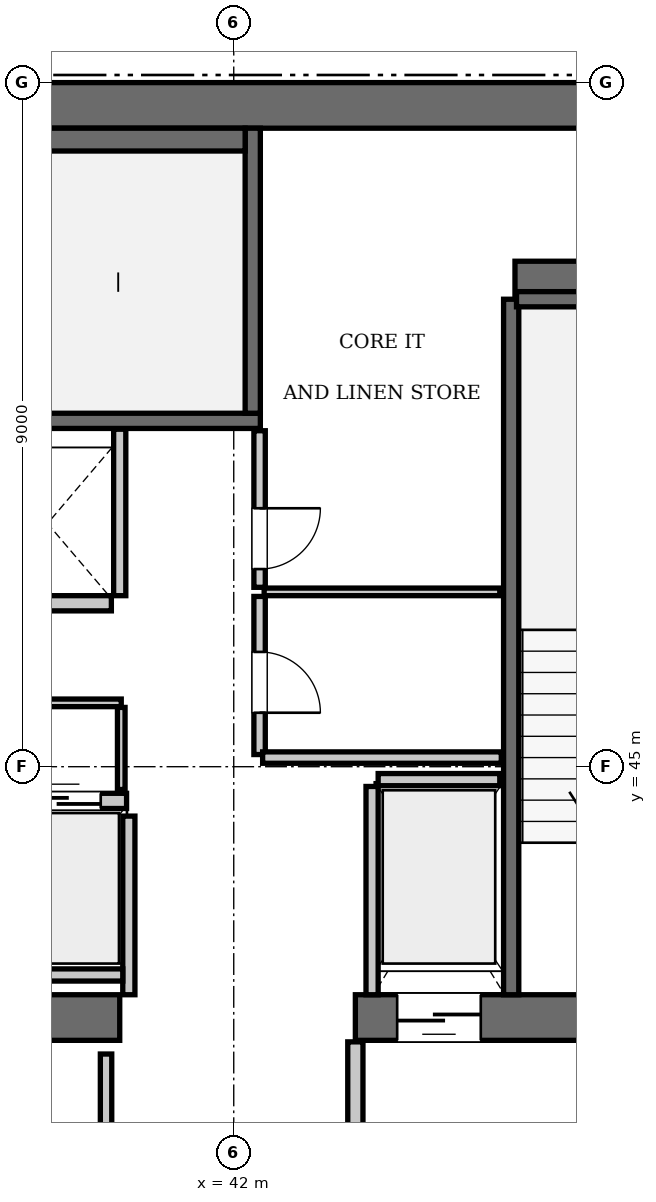
"""IFC4 building model, lengths in metres.
Left out: names, types, materials, properties, quantities, classifications, styles, units other than length and angle.
Written with IfcOpenShell. Run it as: python <this file> out.ifc"""

import sys

from ifc_helpers import new_model, si_unit, direction, frame, frame_2d, origin, place, context, subcontext, project, spatial, rectangle, extrude, element, fill, save


model = new_model("IFC4")
c1 = context("Model", 3, precision=1e-05, world=origin(), true_north=direction((0.0, 1.0)))
c2 = subcontext(c1, "Body", "Model", "MODEL_VIEW")
j1 = project(units=[si_unit("LENGTHUNIT", "METRE"), si_unit("PLANEANGLEUNIT", "RADIAN")], contexts=[c1])
p1 = place(None, origin())
s1 = spatial("IfcSite", under=j1, at=p1, CompositionType="ELEMENT")
p2 = place(p1, origin())
s2 = spatial("IfcBuilding", under=s1, at=p2, CompositionType="ELEMENT")
p3 = place(p2, frame((0.0, 0.0, 293.3)))
s3 = spatial("IfcBuildingStorey", under=s2, at=p3, CompositionType="ELEMENT", Elevation=293.3)
p4 = place(p3, frame((25.2, 53.7, 0.0), z_axis=(0.0, 0.0, 1.0), x_axis=(1.0, 0.0, 0.0)))
e1 = element("IfcWall", 1, at=p4, inside=s3, PredefinedType="SHEAR", context=c2, shape_type="SweptSolid", body=[
    extrude(rectangle(XDim=25.2, YDim=0.6, at=frame_2d((12.6, 0.0))), origin(), (0.0, 0.0, 1.0), 3.85),
])
p5 = place(p3, frame((35.1, 41.7, 0.0), z_axis=(0.0, 0.0, 1.0), x_axis=(1.0, 0.0, 0.0)))
e2 = element("IfcWall", 2, at=p5, inside=s3, PredefinedType="SHEAR", context=c2, shape_type="SweptSolid", body=[
    extrude(rectangle(XDim=5.4, YDim=0.6, at=frame_2d((2.7, 0.0))), origin(), (0.0, 0.0, 1.0), 3.85),
])
p6 = place(p3, frame((43.6, 41.7, 0.0), z_axis=(0.0, 0.0, 1.0), x_axis=(1.0, 0.0, 0.0)))
e3 = element("IfcWall", 3, at=p6, inside=s3, PredefinedType="SHEAR", context=c2, shape_type="SweptSolid", body=[
    extrude(rectangle(XDim=6.8, YDim=0.6, at=frame_2d((3.4, 0.0))), origin(), (0.0, 0.0, 1.0), 3.85),
])
p7 = place(p6, frame((3.9, 0.0, 0.0)))
e4 = element("IfcOpeningElement", 4, at=p7, cuts=e3, PredefinedType="OPENING", context=c2, shape_type="SweptSolid", body=[
    extrude(rectangle(XDim=1.15, YDim=2.15, at=frame_2d((0.575, 1.075))), frame((0.0, 0.31, 0.0), z_axis=(0.0, -1.0, 0.0), x_axis=(1.0, 0.0, 0.0)), (0.0, 0.0, 1.0), 0.62),
])
p8 = place(p6, frame((0.55, 0.0, 0.0)))
e5 = element("IfcOpeningElement", 5, at=p8, cuts=e3, PredefinedType="OPENING", context=c2, shape_type="SweptSolid", body=[
    extrude(rectangle(XDim=1.1, YDim=2.2, at=frame_2d((0.55, 1.1))), frame((0.0, 0.31, 0.0), z_axis=(0.0, -1.0, 0.0), x_axis=(1.0, 0.0, 0.0)), (0.0, 0.0, 1.0), 0.62),
])
p9 = place(p3, frame((45.7, 51.4, 0.0), z_axis=(0.0, 0.0, 1.0), x_axis=(1.0, 0.0, 0.0)))
e6 = element("IfcWall", 6, at=p9, inside=s3, PredefinedType="SHEAR", context=c2, shape_type="SweptSolid", body=[
    extrude(rectangle(XDim=4.1, YDim=0.5, at=frame_2d((2.05, 0.0))), origin(), (0.0, 0.0, 1.0), 3.85),
])
p10 = place(p3, frame((33.25, 49.55, 0.0), z_axis=(0.0, 0.0, 1.0), x_axis=(1.0, 0.0, 0.0)))
e7 = element("IfcWall", 7, at=p10, inside=s3, PredefinedType="SOLIDWALL", context=c2, shape_type="SweptSolid", body=[
    extrude(rectangle(XDim=9.1, YDim=0.2, at=frame_2d((4.55, 0.0))), origin(), (0.0, 0.0, 1.0), 3.61),
])
p11 = place(p3, frame((42.25, 49.65, 0.0), z_axis=(0.0, 0.0, 1.0), x_axis=(0.0, 1.0, 0.0)))
e8 = element("IfcWall", 8, at=p11, inside=s3, PredefinedType="SOLIDWALL", context=c2, shape_type="SweptSolid", body=[
    extrude(rectangle(XDim=3.75, YDim=0.2, at=frame_2d((1.875, 0.0))), origin(), (0.0, 0.0, 1.0), 3.61),
])
p12 = place(p3, frame((33.45, 53.25, 0.0), z_axis=(0.0, 0.0, 1.0), x_axis=(1.0, 0.0, 0.0)))
e9 = element("IfcWall", 9, at=p12, inside=s3, PredefinedType="SOLIDWALL", context=c2, shape_type="SweptSolid", body=[
    extrude(rectangle(XDim=8.7, YDim=0.3, at=frame_2d((4.35, 0.0))), origin(), (0.0, 0.0, 1.0), 3.61),
])
p13 = place(p3, frame((45.65, 42.0, 0.0), z_axis=(0.0, 0.0, 1.0), x_axis=(0.0, 1.0, 0.0)))
e10 = element("IfcWall", 10, at=p13, inside=s3, PredefinedType="SOLIDWALL", context=c2, shape_type="SweptSolid", body=[
    extrude(rectangle(XDim=9.15, YDim=0.2, at=frame_2d((4.575, 0.0))), origin(), (0.0, 0.0, 1.0), 3.61),
])
p14 = place(p3, frame((45.72, 51.15, 0.0), z_axis=(0.0, 0.0, 1.0), x_axis=(1.0, 0.0, 0.0)))
e11 = element("IfcWall", 11, at=p14, inside=s3, PredefinedType="SOLIDWALL", context=c2, shape_type="SweptSolid", body=[
    extrude(rectangle(XDim=3.5, YDim=0.2, at=frame_2d((1.75, 0.0))), origin(), (0.0, 0.0, 1.0), 3.61),
])
p15 = place(p3, frame((38.91, 44.55, 0.0), z_axis=(0.0, 0.0, 1.0), x_axis=(1.0, 0.0, 0.0)))
e12 = element("IfcWall", 12, at=p15, inside=s3, PredefinedType="SOLIDWALL", context=c2, shape_type="SweptSolid", body=[
    extrude(rectangle(XDim=1.68, YDim=0.2, at=frame_2d((0.84, 0.0))), origin(), (0.0, 0.0, 1.0), 3.61),
])
p16 = place(p15, frame((0.34, 0.0, 0.0)))
e13 = element("IfcOpeningElement", 13, at=p16, cuts=e12, PredefinedType="OPENING", context=c2, shape_type="SweptSolid", body=[
    extrude(rectangle(XDim=1.0, YDim=2.15, at=frame_2d((0.5, 1.075))), frame((0.0, 0.11, 0.0), z_axis=(0.0, -1.0, 0.0), x_axis=(1.0, 0.0, 0.0)), (0.0, 0.0, 1.0), 0.22),
])
p17 = place(p3, frame((38.71, 47.15, 0.0), z_axis=(0.0, 0.0, 1.0), x_axis=(1.0, 0.0, 0.0)))
e14 = element("IfcWall", 14, at=p17, inside=s3, PredefinedType="SOLIDWALL", context=c2, shape_type="SweptSolid", body=[
    extrude(rectangle(XDim=1.68, YDim=0.2, at=frame_2d((0.84, 0.0))), origin(), (0.0, 0.0, 1.0), 3.61),
])
p18 = place(p3, frame((43.9, 44.83, 0.0), z_axis=(0.0, 0.0, 1.0), x_axis=(1.0, 0.0, 0.0)))
e15 = element("IfcWall", 15, at=p18, inside=s3, PredefinedType="SOLIDWALL", context=c2, shape_type="SweptSolid", body=[
    extrude(rectangle(XDim=1.6, YDim=0.16, at=frame_2d((0.8, 0.0))), origin(), (0.0, 0.0, 1.0), 3.61),
])
p19 = place(p3, frame((43.82, 42.0, 0.0), z_axis=(0.0, 0.0, 1.0), x_axis=(0.0, 1.0, 0.0)))
e16 = element("IfcWall", 16, at=p19, inside=s3, PredefinedType="SOLIDWALL", context=c2, shape_type="SweptSolid", body=[
    extrude(rectangle(XDim=2.74, YDim=0.16, at=frame_2d((1.37, 0.0))), origin(), (0.0, 0.0, 1.0), 3.61),
])
p20 = place(p3, frame((40.62, 42.0, 0.0), z_axis=(0.0, 0.0, 1.0), x_axis=(0.0, 1.0, 0.0)))
e17 = element("IfcWall", 17, at=p20, inside=s3, PredefinedType="SOLIDWALL", context=c2, shape_type="SweptSolid", body=[
    extrude(rectangle(XDim=2.35, YDim=0.16, at=frame_2d((1.175, 0.0))), origin(), (0.0, 0.0, 1.0), 3.61),
])
p21 = place(p3, frame((35.52, 42.26, 0.0), z_axis=(0.0, 0.0, 1.0), x_axis=(1.0, 0.0, 0.0)))
e18 = element("IfcWall", 18, at=p21, inside=s3, PredefinedType="SOLIDWALL", context=c2, shape_type="SweptSolid", body=[
    extrude(rectangle(XDim=5.02, YDim=0.16, at=frame_2d((2.51, 0.0))), origin(), (0.0, 0.0, 1.0), 3.61),
])
p22 = place(p3, frame((40.5, 47.25, 0.0), z_axis=(0.0, 0.0, 1.0), x_axis=(0.0, 1.0, 0.0)))
e19 = element("IfcWall", 19, at=p22, inside=s3, PredefinedType="SOLIDWALL", context=c2, shape_type="SweptSolid", body=[
    extrude(rectangle(XDim=2.19, YDim=0.16, at=frame_2d((1.095, 0.0))), origin(), (0.0, 0.0, 1.0), 3.61),
])
p23 = place(p3, frame((43.6, 38.31, 0.0), z_axis=(0.0, 0.0, 1.0), x_axis=(0.0, 1.0, 0.0)))
e20 = element("IfcWall", 20, at=p23, inside=s3, PredefinedType="PARTITIONING", context=c2, shape_type="SweptSolid", body=[
    extrude(rectangle(XDim=3.07, YDim=0.2, at=frame_2d((1.535, 0.0))), origin(), (0.0, 0.0, 1.0), 3.61),
])
p24 = place(p3, frame((35.58, 45.84, 0.0), z_axis=(0.0, 0.0, 1.0), x_axis=(1.0, 0.0, 0.0)))
e21 = element("IfcWall", 21, at=p24, inside=s3, PredefinedType="PARTITIONING", context=c2, shape_type="SweptSolid", body=[
    extrude(rectangle(XDim=4.94, YDim=0.1, at=frame_2d((2.47, 0.0))), origin(), (0.0, 0.0, 1.0), 3.61),
])
p25 = place(p24, frame((1.8, 0.0, 0.0)))
e22 = element("IfcOpeningElement", 22, at=p25, cuts=e21, PredefinedType="OPENING", context=c2, shape_type="SweptSolid", body=[
    extrude(rectangle(XDim=0.8, YDim=2.05, at=frame_2d((0.4, 1.025))), frame((0.0, 0.06, 0.0), z_axis=(0.0, -1.0, 0.0), x_axis=(1.0, 0.0, 0.0)), (0.0, 0.0, 1.0), 0.12),
])
p26 = place(p3, frame((40.52, 44.7, 0.0), z_axis=(0.0, 0.0, 1.0), x_axis=(0.0, 1.0, 0.0)))
e23 = element("IfcWall", 23, at=p26, inside=s3, PredefinedType="PARTITIONING", context=c2, shape_type="SweptSolid", body=[
    extrude(rectangle(XDim=1.08, YDim=0.1, at=frame_2d((0.54, 0.0))), origin(), (0.0, 0.0, 1.0), 3.61),
])
p27 = place(p3, frame((42.34, 45.16, 0.0), z_axis=(0.0, 0.0, 1.0), x_axis=(0.0, 1.0, 0.0)))
e24 = element("IfcWall", 24, at=p27, inside=s3, PredefinedType="PARTITIONING", context=c2, shape_type="SweptSolid", body=[
    extrude(rectangle(XDim=2.08, YDim=0.15, at=frame_2d((1.04, 0.0))), origin(), (0.0, 0.0, 1.0), 3.61),
])
p28 = place(p27, frame((0.55, 0.0, 0.0)))
e25 = element("IfcOpeningElement", 25, at=p28, cuts=e24, PredefinedType="OPENING", context=c2, shape_type="SweptSolid", body=[
    extrude(rectangle(XDim=0.8, YDim=2.05, at=frame_2d((0.4, 1.025))), frame((0.0, 0.085, 0.0), z_axis=(0.0, -1.0, 0.0), x_axis=(1.0, 0.0, 0.0)), (0.0, 0.0, 1.0), 0.17),
])
p29 = place(p3, frame((42.34, 47.36, 0.0), z_axis=(0.0, 0.0, 1.0), x_axis=(0.0, 1.0, 0.0)))
e26 = element("IfcWall", 26, at=p29, inside=s3, PredefinedType="PARTITIONING", context=c2, shape_type="SweptSolid", body=[
    extrude(rectangle(XDim=2.06, YDim=0.15, at=frame_2d((1.03, 0.0))), origin(), (0.0, 0.0, 1.0), 3.61),
])
p30 = place(p29, frame((0.24, 0.0, 0.0)))
e27 = element("IfcOpeningElement", 27, at=p30, cuts=e26, PredefinedType="OPENING", context=c2, shape_type="SweptSolid", body=[
    extrude(rectangle(XDim=0.8, YDim=2.05, at=frame_2d((0.4, 1.025))), frame((0.0, 0.085, 0.0), z_axis=(0.0, -1.0, 0.0), x_axis=(1.0, 0.0, 0.0)), (0.0, 0.0, 1.0), 0.17),
])
p31 = place(p3, frame((42.4, 47.3, 0.0), z_axis=(0.0, 0.0, 1.0), x_axis=(1.0, 0.0, 0.0)))
e28 = element("IfcWall", 28, at=p31, inside=s3, PredefinedType="PARTITIONING", context=c2, shape_type="SweptSolid", body=[
    extrude(rectangle(XDim=3.1, YDim=0.1, at=frame_2d((1.55, 0.0))), origin(), (0.0, 0.0, 1.0), 3.61),
])
p32 = place(p3, frame((42.38, 45.12, 0.0), z_axis=(0.0, 0.0, 1.0), x_axis=(1.0, 0.0, 0.0)))
e29 = element("IfcWall", 29, at=p32, inside=s3, PredefinedType="PARTITIONING", context=c2, shape_type="SweptSolid", body=[
    extrude(rectangle(XDim=3.14, YDim=0.15, at=frame_2d((1.57, 0.0))), origin(), (0.0, 0.0, 1.0), 3.61),
])
p33 = place(p3, frame((40.32, 38.38, 0.0), z_axis=(0.0, 0.0, 1.0), x_axis=(0.0, 1.0, 0.0)))
e30 = element("IfcWall", 30, at=p33, inside=s3, PredefinedType="PARTITIONING", context=c2, shape_type="SweptSolid", body=[
    extrude(rectangle(XDim=2.84, YDim=0.15, at=frame_2d((1.42, 0.0))), origin(), (0.0, 0.0, 1.0), 3.61),
])
p34 = place(p16, origin())
e31 = element("IfcDoor", 31, at=p34, inside=s3, OperationType="SLIDING_TO_LEFT", PredefinedType="DOOR", context=c2, shape_type="SweptSolid", body=[
    extrude(rectangle(XDim=1.0, YDim=2.15, at=frame_2d((0.5, 1.075))), frame((0.0, 0.025, 0.0), z_axis=(0.0, -1.0, 0.0), x_axis=(1.0, 0.0, 0.0)), (0.0, 0.0, 1.0), 0.05),
])
fill(e13, e31)
p35 = place(p8, frame((1.1, 0.0, 0.0), z_axis=(0.0, 0.0, 1.0), x_axis=(-1.0, 0.0, 0.0)))
e32 = element("IfcDoor", 32, at=p35, inside=s3, OperationType="SLIDING_TO_LEFT", PredefinedType="DOOR", context=c2, shape_type="SweptSolid", body=[
    extrude(rectangle(XDim=1.1, YDim=2.2, at=frame_2d((0.55, 1.1))), frame((0.0, 0.025, 0.0), z_axis=(0.0, -1.0, 0.0), x_axis=(1.0, 0.0, 0.0)), (0.0, 0.0, 1.0), 0.05),
])
fill(e5, e32)
p36 = place(p28, frame((0.8, 0.0, 0.0), z_axis=(0.0, 0.0, 1.0), x_axis=(-1.0, 0.0, 0.0)))
e33 = element("IfcDoor", 33, at=p36, inside=s3, OperationType="SINGLE_SWING_RIGHT", PredefinedType="DOOR", context=c2, shape_type="SweptSolid", body=[
    extrude(rectangle(XDim=0.8, YDim=2.05, at=frame_2d((0.4, 1.025))), frame((0.0, 0.025, 0.0), z_axis=(0.0, -1.0, 0.0), x_axis=(1.0, 0.0, 0.0)), (0.0, 0.0, 1.0), 0.05),
])
fill(e25, e33)
p37 = place(p30, frame((0.8, 0.0, 0.0), z_axis=(0.0, 0.0, 1.0), x_axis=(-1.0, 0.0, 0.0)))
e34 = element("IfcDoor", 34, at=p37, inside=s3, OperationType="SINGLE_SWING_LEFT", PredefinedType="DOOR", context=c2, shape_type="SweptSolid", body=[
    extrude(rectangle(XDim=0.8, YDim=2.05, at=frame_2d((0.4, 1.025))), frame((0.0, 0.025, 0.0), z_axis=(0.0, -1.0, 0.0), x_axis=(1.0, 0.0, 0.0)), (0.0, 0.0, 1.0), 0.05),
])
fill(e27, e34)
save(model, sys.argv[1])
